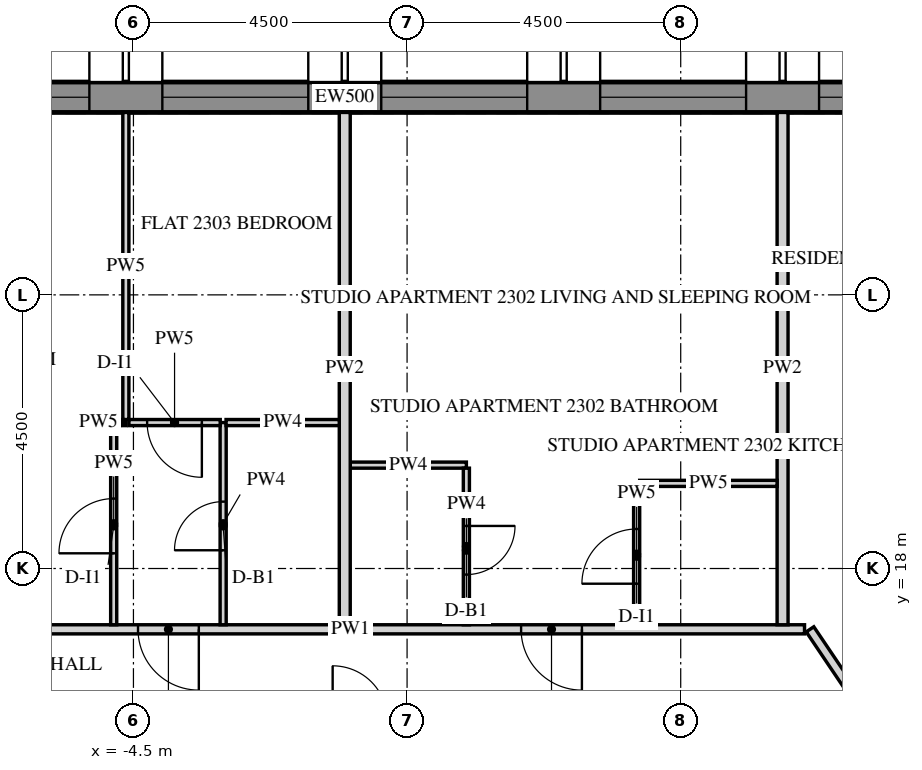
"""IFC4 building model, lengths in metres.
Left out: names, types, materials, properties, quantities, classifications, styles, units other than length and angle.
Written with IfcOpenShell. Run it as: python <this file> out.ifc"""

import sys

from ifc_helpers import new_model, si_unit, direction, frame, frame_2d, origin, place, context, subcontext, project, spatial, polyline, rectangle, outline, extrude, element, fill, save


model = new_model("IFC4")
c1 = context("Model", 3, precision=1e-05, world=origin(), true_north=direction((0.0, 1.0)))
c2 = subcontext(c1, "Body", "Model", "MODEL_VIEW")
j1 = project(units=[si_unit("LENGTHUNIT", "METRE"), si_unit("PLANEANGLEUNIT", "RADIAN")], contexts=[c1])
p1 = place(None, origin())
s1 = spatial("IfcSite", under=j1, at=p1, CompositionType="ELEMENT")
p2 = place(p1, origin())
s2 = spatial("IfcBuilding", under=s1, at=p2, CompositionType="ELEMENT")
p3 = place(p2, frame((0.0, 0.0, 291.3)))
s3 = spatial("IfcBuildingStorey", under=s2, at=p3, CompositionType="ELEMENT", Elevation=291.3)
p4 = place(p3, frame((11.698, 25.75, -0.15), z_axis=(0.0, 0.0, 1.0), x_axis=(-1.0, 0.0, 0.0)))
e1 = element("IfcWall", 1, at=p4, inside=s3, PredefinedType="SOLIDWALL", context=c2, shape_type="SweptSolid", body=[
    extrude(outline(polyline([(-0.021, -0.25), (25.468, -0.25), (25.421, 0.25), (0.021, 0.25), (-0.021, -0.25)])), origin(), (0.0, 0.0, 1.0), 3.9),
])
p5 = place(p4, frame((2.522, 0.0, 0.75)))
e2 = element("IfcOpeningElement", 2, at=p5, cuts=e1, PredefinedType="OPENING", context=c2, shape_type="SweptSolid", body=[
    extrude(rectangle(XDim=2.4, YDim=2.7, at=frame_2d((1.2, 1.35))), frame((0.0, 0.26, 0.0), z_axis=(0.0, -1.0, 0.0), x_axis=(1.0, 0.0, 0.0)), (0.0, 0.0, 1.0), 0.52),
])
p6 = place(p4, frame((6.122, 0.0, 0.75)))
e3 = element("IfcOpeningElement", 3, at=p6, cuts=e1, PredefinedType="OPENING", context=c2, shape_type="SweptSolid", body=[
    extrude(rectangle(XDim=2.4, YDim=2.7, at=frame_2d((1.2, 1.35))), frame((0.0, 0.26, 0.0), z_axis=(0.0, -1.0, 0.0), x_axis=(1.0, 0.0, 0.0)), (0.0, 0.0, 1.0), 0.52),
])
p7 = place(p4, frame((9.722, 0.0, 0.75)))
e4 = element("IfcOpeningElement", 4, at=p7, cuts=e1, PredefinedType="OPENING", context=c2, shape_type="SweptSolid", body=[
    extrude(rectangle(XDim=2.4, YDim=2.7, at=frame_2d((1.2, 1.35))), frame((0.0, 0.26, 0.0), z_axis=(0.0, -1.0, 0.0), x_axis=(1.0, 0.0, 0.0)), (0.0, 0.0, 1.0), 0.52),
])
p8 = place(p4, frame((13.323, 0.0, 0.75)))
e5 = element("IfcOpeningElement", 5, at=p8, cuts=e1, PredefinedType="OPENING", context=c2, shape_type="SweptSolid", body=[
    extrude(rectangle(XDim=2.4, YDim=2.7, at=frame_2d((1.2, 1.35))), frame((0.0, 0.26, 0.0), z_axis=(0.0, -1.0, 0.0), x_axis=(1.0, 0.0, 0.0)), (0.0, 0.0, 1.0), 0.52),
])
p9 = place(p4, frame((16.922, 0.0, 0.75)))
e6 = element("IfcOpeningElement", 6, at=p9, cuts=e1, PredefinedType="OPENING", context=c2, shape_type="SweptSolid", body=[
    extrude(rectangle(XDim=2.4, YDim=2.7, at=frame_2d((1.2, 1.35))), frame((0.0, 0.26, 0.0), z_axis=(0.0, -1.0, 0.0), x_axis=(1.0, 0.0, 0.0)), (0.0, 0.0, 1.0), 0.52),
])
p10 = place(p4, frame((20.522, 0.0, 0.75)))
e7 = element("IfcOpeningElement", 7, at=p10, cuts=e1, PredefinedType="OPENING", context=c2, shape_type="SweptSolid", body=[
    extrude(rectangle(XDim=2.4, YDim=2.7, at=frame_2d((1.2, 1.35))), frame((0.0, 0.26, 0.0), z_axis=(0.0, -1.0, 0.0), x_axis=(1.0, 0.0, 0.0)), (0.0, 0.0, 1.0), 0.52),
])
p11 = place(p3, frame((6.351, 11.0, -0.15), z_axis=(0.0, 0.0, 1.0), x_axis=(0.499998894578, 0.866026041999, 0.0)))
e8 = element("IfcWall", 8, at=p11, inside=s3, PredefinedType="SHEAR", context=c2, shape_type="SweptSolid", body=[
    extrude(rectangle(XDim=15.544, YDim=0.4, at=frame_2d((7.772, 0.0))), origin(), (0.0, 0.0, 1.0), 3.9),
])
p12 = place(p11, frame((6.872, 0.0, 0.15)))
e9 = element("IfcOpeningElement", 9, at=p12, cuts=e8, PredefinedType="OPENING", context=c2, shape_type="SweptSolid", body=[
    extrude(rectangle(XDim=1.8, YDim=2.4, at=frame_2d((0.9, 1.2))), frame((0.0, 0.21, 0.0), z_axis=(0.0, -1.0, 0.0), x_axis=(1.0, 0.0, 0.0)), (0.0, 0.0, 1.0), 0.42),
])
p13 = place(p3, frame((7.24, 16.09, 0.0), z_axis=(0.0, 0.0, 1.0), x_axis=(-0.559159452146, 0.829060134777, 0.0)))
e10 = element("IfcWall", 10, at=p13, inside=s3, PredefinedType="PARTITIONING", context=c2, shape_type="SweptSolid", body=[
    extrude(rectangle(XDim=1.097, YDim=0.15, at=frame_2d((0.549, 0.0))), origin(), (0.0, 0.0, 1.0), 2.988),
])
p14 = place(p3, frame((6.536, 17.0, 0.0), z_axis=(0.0, 0.0, 1.0), x_axis=(-1.0, 0.0, 0.0)))
e11 = element("IfcWall", 11, at=p14, inside=s3, PredefinedType="PARTITIONING", context=c2, shape_type="SweptSolid", body=[
    extrude(rectangle(XDim=14.934, YDim=0.15, at=frame_2d((7.467, 0.0))), origin(), (0.0, 0.0, 1.0), 2.988),
])
p15 = place(p14, frame((3.661, 0.0, 0.0)))
e12 = element("IfcOpeningElement", 12, at=p15, cuts=e11, PredefinedType="OPENING", context=c2, shape_type="SweptSolid", body=[
    extrude(rectangle(XDim=1.0, YDim=2.1, at=frame_2d((0.5, 1.05))), frame((0.0, 0.085, 0.0), z_axis=(0.0, -1.0, 0.0), x_axis=(1.0, 0.0, 0.0)), (0.0, 0.0, 1.0), 0.17),
])
p16 = place(p14, frame((9.961, 0.0, 0.0)))
e13 = element("IfcOpeningElement", 13, at=p16, cuts=e11, PredefinedType="OPENING", context=c2, shape_type="SweptSolid", body=[
    extrude(rectangle(XDim=1.0, YDim=2.1, at=frame_2d((0.5, 1.05))), frame((0.0, 0.085, 0.0), z_axis=(0.0, -1.0, 0.0), x_axis=(1.0, 0.0, 0.0)), (0.0, 0.0, 1.0), 0.17),
])
p17 = place(p3, frame((6.175, 25.5, 0.0), z_axis=(0.0, 0.0, 1.0), x_axis=(0.0, -1.0, 0.0)))
e14 = element("IfcWall", 14, at=p17, inside=s3, PredefinedType="PARTITIONING", context=c2, shape_type="SweptSolid", body=[
    extrude(rectangle(XDim=8.425, YDim=0.18, at=frame_2d((4.212, 0.0))), origin(), (0.0, 0.0, 1.0), 2.988),
])
p18 = place(p3, frame((-0.935, 19.7, 0.0), z_axis=(0.0, 0.0, 1.0), x_axis=(1.0, 0.0, 0.0)))
e15 = element("IfcWall", 15, at=p18, inside=s3, PredefinedType="PARTITIONING", context=c2, shape_type="SweptSolid", body=[
    extrude(rectangle(XDim=1.91, YDim=0.1, at=frame_2d((0.955, 0.0))), origin(), (0.0, 0.0, 1.0), 2.988),
])
p19 = place(p3, frame((0.975, 19.65, 0.0), z_axis=(0.0, 0.0, 1.0), x_axis=(0.0, -1.0, 0.0)))
e16 = element("IfcWall", 16, at=p19, inside=s3, PredefinedType="PARTITIONING", context=c2, shape_type="SweptSolid", body=[
    extrude(rectangle(XDim=2.575, YDim=0.1, at=frame_2d((1.288, 0.0))), origin(), (0.0, 0.0, 1.0), 2.988),
])
p20 = place(p19, frame((0.95, 0.0, 0.0)))
e17 = element("IfcOpeningElement", 17, at=p20, cuts=e16, PredefinedType="OPENING", context=c2, shape_type="SweptSolid", body=[
    extrude(rectangle(XDim=0.8, YDim=2.1, at=frame_2d((0.4, 1.05))), frame((0.0, 0.06, 0.0), z_axis=(0.0, -1.0, 0.0), x_axis=(1.0, 0.0, 0.0)), (0.0, 0.0, 1.0), 0.12),
])
p21 = place(p3, frame((3.775, 17.075, 0.0), z_axis=(0.0, 0.0, 1.0), x_axis=(0.0, 1.0, 0.0)))
e18 = element("IfcWall", 18, at=p21, inside=s3, PredefinedType="PARTITIONING", context=c2, shape_type="SweptSolid", body=[
    extrude(rectangle(XDim=2.325, YDim=0.1, at=frame_2d((1.163, 0.0))), origin(), (0.0, 0.0, 1.0), 2.988),
])
p22 = place(p21, frame((0.675, 0.0, 0.0)))
e19 = element("IfcOpeningElement", 19, at=p22, cuts=e18, PredefinedType="OPENING", context=c2, shape_type="SweptSolid", body=[
    extrude(rectangle(XDim=0.9, YDim=2.1, at=frame_2d((0.45, 1.05))), frame((0.0, 0.06, 0.0), z_axis=(0.0, -1.0, 0.0), x_axis=(1.0, 0.0, 0.0)), (0.0, 0.0, 1.0), 0.12),
])
p23 = place(p3, frame((3.825, 19.4, 0.0), z_axis=(0.0, 0.0, 1.0), x_axis=(1.0, 0.0, 0.0)))
e20 = element("IfcWall", 20, at=p23, inside=s3, PredefinedType="PARTITIONING", context=c2, shape_type="SweptSolid", body=[
    extrude(rectangle(XDim=2.26, YDim=0.1, at=frame_2d((1.13, 0.0))), origin(), (0.0, 0.0, 1.0), 2.988),
])
p24 = place(p3, frame((-1.025, 25.5, 0.0), z_axis=(0.0, 0.0, 1.0), x_axis=(0.0, -1.0, 0.0)))
e21 = element("IfcWall", 21, at=p24, inside=s3, PredefinedType="PARTITIONING", context=c2, shape_type="SweptSolid", body=[
    extrude(rectangle(XDim=8.425, YDim=0.18, at=frame_2d((4.212, 0.0))), origin(), (0.0, 0.0, 1.0), 2.988),
])
p25 = place(p3, frame((-4.825, 17.075, 0.0), z_axis=(0.0, 0.0, 1.0), x_axis=(0.0, 1.0, 0.0)))
e22 = element("IfcWall", 22, at=p25, inside=s3, PredefinedType="PARTITIONING", context=c2, shape_type="SweptSolid", body=[
    extrude(rectangle(XDim=3.325, YDim=0.1, at=frame_2d((1.663, 0.0))), origin(), (0.0, 0.0, 1.0), 2.988),
])
p26 = place(p25, frame((1.175, 0.0, 0.0)))
e23 = element("IfcOpeningElement", 23, at=p26, cuts=e22, PredefinedType="OPENING", context=c2, shape_type="SweptSolid", body=[
    extrude(rectangle(XDim=0.9, YDim=2.1, at=frame_2d((0.45, 1.05))), frame((0.0, 0.06, 0.0), z_axis=(0.0, -1.0, 0.0), x_axis=(1.0, 0.0, 0.0)), (0.0, 0.0, 1.0), 0.12),
])
p27 = place(p3, frame((-4.775, 20.4, 0.0), z_axis=(0.0, 0.0, 1.0), x_axis=(1.0, 0.0, 0.0)))
e24 = element("IfcWall", 24, at=p27, inside=s3, PredefinedType="PARTITIONING", context=c2, shape_type="SweptSolid", body=[
    extrude(rectangle(XDim=0.152, YDim=0.1, at=frame_2d((0.076, 0.0))), origin(), (0.0, 0.0, 1.0), 2.988),
])
p28 = place(p3, frame((-4.625, 20.45, 0.0), z_axis=(0.0, 0.0, 1.0), x_axis=(0.0, 1.0, 0.0)))
e25 = element("IfcWall", 25, at=p28, inside=s3, PredefinedType="PARTITIONING", context=c2, shape_type="SweptSolid", body=[
    extrude(rectangle(XDim=5.05, YDim=0.1, at=frame_2d((2.525, 0.0))), origin(), (0.0, 0.0, 1.0), 2.988),
])
p29 = place(p3, frame((-3.025, 17.075, 0.0), z_axis=(0.0, 0.0, 1.0), x_axis=(0.0, 1.0, 0.0)))
e26 = element("IfcWall", 26, at=p29, inside=s3, PredefinedType="PARTITIONING", context=c2, shape_type="SweptSolid", body=[
    extrude(rectangle(XDim=3.325, YDim=0.1, at=frame_2d((1.663, 0.0))), origin(), (0.0, 0.0, 1.0), 2.988),
])
p30 = place(p29, frame((1.225, 0.0, 0.0)))
e27 = element("IfcOpeningElement", 27, at=p30, cuts=e26, PredefinedType="OPENING", context=c2, shape_type="SweptSolid", body=[
    extrude(rectangle(XDim=0.8, YDim=2.1, at=frame_2d((0.4, 1.05))), frame((0.0, 0.06, 0.0), z_axis=(0.0, -1.0, 0.0), x_axis=(1.0, 0.0, 0.0)), (0.0, 0.0, 1.0), 0.12),
])
p31 = place(p3, frame((-3.073, 20.4, 0.0), z_axis=(0.0, 0.0, 1.0), x_axis=(-1.0, 0.0, 0.0)))
e28 = element("IfcWall", 28, at=p31, inside=s3, PredefinedType="PARTITIONING", context=c2, shape_type="SweptSolid", body=[
    extrude(rectangle(XDim=1.502, YDim=0.1, at=frame_2d((0.751, 0.0))), origin(), (0.0, 0.0, 1.0), 2.988),
])
p32 = place(p31, frame((0.302, 0.0, 0.0)))
e29 = element("IfcOpeningElement", 29, at=p32, cuts=e28, PredefinedType="OPENING", context=c2, shape_type="SweptSolid", body=[
    extrude(rectangle(XDim=0.9, YDim=2.1, at=frame_2d((0.45, 1.05))), frame((0.0, 0.06, 0.0), z_axis=(0.0, -1.0, 0.0), x_axis=(1.0, 0.0, 0.0)), (0.0, 0.0, 1.0), 0.12),
])
p33 = place(p3, frame((-1.115, 20.4, 0.0), z_axis=(0.0, 0.0, 1.0), x_axis=(-1.0, 0.0, 0.0)))
e30 = element("IfcWall", 30, at=p33, inside=s3, PredefinedType="PARTITIONING", context=c2, shape_type="SweptSolid", body=[
    extrude(rectangle(XDim=1.862, YDim=0.1, at=frame_2d((0.931, 0.0))), origin(), (0.0, 0.0, 1.0), 2.988),
])
p34 = place(p5, frame((0.0, 0.18, 0.0)))
e31 = element("IfcWindow", 31, at=p34, inside=s3, PartitioningType="DOUBLE_PANEL_VERTICAL", PredefinedType="WINDOW", context=c2, shape_type="SweptSolid", body=[
    extrude(rectangle(XDim=2.4, YDim=2.7, at=frame_2d((1.2, 1.35))), frame((0.0, 0.03, 0.0), z_axis=(0.0, -1.0, 0.0), x_axis=(1.0, 0.0, 0.0)), (0.0, 0.0, 1.0), 0.06),
])
fill(e2, e31)
p35 = place(p6, frame((0.0, 0.18, 0.0)))
e32 = element("IfcWindow", 32, at=p35, inside=s3, PartitioningType="DOUBLE_PANEL_VERTICAL", PredefinedType="WINDOW", context=c2, shape_type="SweptSolid", body=[
    extrude(rectangle(XDim=2.4, YDim=2.7, at=frame_2d((1.2, 1.35))), frame((0.0, 0.03, 0.0), z_axis=(0.0, -1.0, 0.0), x_axis=(1.0, 0.0, 0.0)), (0.0, 0.0, 1.0), 0.06),
])
fill(e3, e32)
p36 = place(p7, frame((0.0, 0.18, 0.0)))
e33 = element("IfcWindow", 33, at=p36, inside=s3, PartitioningType="DOUBLE_PANEL_VERTICAL", PredefinedType="WINDOW", context=c2, shape_type="SweptSolid", body=[
    extrude(rectangle(XDim=2.4, YDim=2.7, at=frame_2d((1.2, 1.35))), frame((0.0, 0.03, 0.0), z_axis=(0.0, -1.0, 0.0), x_axis=(1.0, 0.0, 0.0)), (0.0, 0.0, 1.0), 0.06),
])
fill(e4, e33)
p37 = place(p8, frame((0.0, 0.18, 0.0)))
e34 = element("IfcWindow", 34, at=p37, inside=s3, PartitioningType="DOUBLE_PANEL_VERTICAL", PredefinedType="WINDOW", context=c2, shape_type="SweptSolid", body=[
    extrude(rectangle(XDim=2.4, YDim=2.7, at=frame_2d((1.2, 1.35))), frame((0.0, 0.03, 0.0), z_axis=(0.0, -1.0, 0.0), x_axis=(1.0, 0.0, 0.0)), (0.0, 0.0, 1.0), 0.06),
])
fill(e5, e34)
p38 = place(p9, frame((0.0, 0.18, 0.0)))
e35 = element("IfcWindow", 35, at=p38, inside=s3, PartitioningType="DOUBLE_PANEL_VERTICAL", PredefinedType="WINDOW", context=c2, shape_type="SweptSolid", body=[
    extrude(rectangle(XDim=2.4, YDim=2.7, at=frame_2d((1.2, 1.35))), frame((0.0, 0.03, 0.0), z_axis=(0.0, -1.0, 0.0), x_axis=(1.0, 0.0, 0.0)), (0.0, 0.0, 1.0), 0.06),
])
fill(e6, e35)
p39 = place(p15, origin())
e36 = element("IfcDoor", 36, at=p39, inside=s3, OperationType="SINGLE_SWING_LEFT", PredefinedType="DOOR", context=c2, shape_type="SweptSolid", body=[
    extrude(rectangle(XDim=1.0, YDim=2.1, at=frame_2d((0.5, 1.05))), frame((0.0, 0.025, 0.0), z_axis=(0.0, -1.0, 0.0), x_axis=(1.0, 0.0, 0.0)), (0.0, 0.0, 1.0), 0.05),
])
fill(e12, e36)
p40 = place(p20, origin())
e37 = element("IfcDoor", 37, at=p40, inside=s3, OperationType="SINGLE_SWING_LEFT", PredefinedType="DOOR", context=c2, shape_type="SweptSolid", body=[
    extrude(rectangle(XDim=0.8, YDim=2.1, at=frame_2d((0.4, 1.05))), frame((0.0, 0.025, 0.0), z_axis=(0.0, -1.0, 0.0), x_axis=(1.0, 0.0, 0.0)), (0.0, 0.0, 1.0), 0.05),
])
fill(e17, e37)
p41 = place(p22, origin())
e38 = element("IfcDoor", 38, at=p41, inside=s3, OperationType="SINGLE_SWING_RIGHT", PredefinedType="DOOR", context=c2, shape_type="SweptSolid", body=[
    extrude(rectangle(XDim=0.9, YDim=2.1, at=frame_2d((0.45, 1.05))), frame((0.0, 0.025, 0.0), z_axis=(0.0, -1.0, 0.0), x_axis=(1.0, 0.0, 0.0)), (0.0, 0.0, 1.0), 0.05),
])
fill(e19, e38)
p42 = place(p16, origin())
e39 = element("IfcDoor", 39, at=p42, inside=s3, OperationType="SINGLE_SWING_RIGHT", PredefinedType="DOOR", context=c2, shape_type="SweptSolid", body=[
    extrude(rectangle(XDim=1.0, YDim=2.1, at=frame_2d((0.5, 1.05))), frame((0.0, 0.025, 0.0), z_axis=(0.0, -1.0, 0.0), x_axis=(1.0, 0.0, 0.0)), (0.0, 0.0, 1.0), 0.05),
])
fill(e13, e39)
p43 = place(p30, origin())
e40 = element("IfcDoor", 40, at=p43, inside=s3, OperationType="SINGLE_SWING_RIGHT", PredefinedType="DOOR", context=c2, shape_type="SweptSolid", body=[
    extrude(rectangle(XDim=0.8, YDim=2.1, at=frame_2d((0.4, 1.05))), frame((0.0, 0.025, 0.0), z_axis=(0.0, -1.0, 0.0), x_axis=(1.0, 0.0, 0.0)), (0.0, 0.0, 1.0), 0.05),
])
fill(e27, e40)
p44 = place(p26, origin())
e41 = element("IfcDoor", 41, at=p44, inside=s3, OperationType="SINGLE_SWING_RIGHT", PredefinedType="DOOR", context=c2, shape_type="SweptSolid", body=[
    extrude(rectangle(XDim=0.9, YDim=2.1, at=frame_2d((0.45, 1.05))), frame((0.0, 0.025, 0.0), z_axis=(0.0, -1.0, 0.0), x_axis=(1.0, 0.0, 0.0)), (0.0, 0.0, 1.0), 0.05),
])
fill(e23, e41)
p45 = place(p32, origin())
e42 = element("IfcDoor", 42, at=p45, inside=s3, OperationType="SINGLE_SWING_RIGHT", PredefinedType="DOOR", context=c2, shape_type="SweptSolid", body=[
    extrude(rectangle(XDim=0.9, YDim=2.1, at=frame_2d((0.45, 1.05))), frame((0.0, 0.025, 0.0), z_axis=(0.0, -1.0, 0.0), x_axis=(1.0, 0.0, 0.0)), (0.0, 0.0, 1.0), 0.05),
])
fill(e29, e42)
save(model, sys.argv[1])
